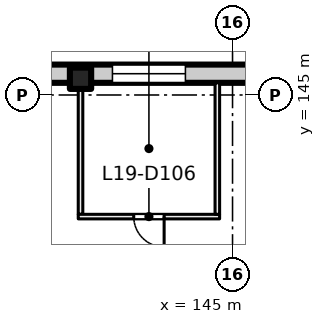
"""IFC4 building model, lengths in metres.
Left out: names, types, materials, properties, quantities, classifications, styles, units other than length and angle.
Written with IfcOpenShell. Run it as: python <this file> out.ifc"""

import sys

from ifc_helpers import new_model, si_unit, direction, frame, frame_2d, origin, origin_2d, place, context, subcontext, project, spatial, rectangle, extrude, element, fill, save


model = new_model("IFC4")
c1 = context("Model", 3, precision=1e-05, world=origin(), true_north=direction((0.0, 1.0)))
c2 = subcontext(c1, "Body", "Model", "MODEL_VIEW")
j1 = project(units=[si_unit("LENGTHUNIT", "METRE"), si_unit("PLANEANGLEUNIT", "RADIAN")], contexts=[c1])
p1 = place(None, origin())
s1 = spatial("IfcSite", under=j1, at=p1, CompositionType="ELEMENT")
p2 = place(p1, origin())
s2 = spatial("IfcBuilding", under=s1, at=p2, CompositionType="ELEMENT")
p3 = place(p2, frame((0.0, 0.0, 85.0)))
s3 = spatial("IfcBuildingStorey", under=s2, at=p3, CompositionType="ELEMENT", Elevation=85.0)
p4 = place(p3, frame((140.0, 145.55, 0.0), z_axis=(0.0, 0.0, 1.0), x_axis=(1.0, 0.0, 0.0)))
e1 = element("IfcColumn", 1, at=p4, inside=s3, PredefinedType="COLUMN", context=c2, shape_type="SweptSolid", body=[
    extrude(rectangle(XDim=0.7, YDim=0.7, at=origin_2d()), origin(), (0.0, 0.0, 1.0), 4.0),
])
p5 = place(p3, frame((131.07, 145.7, 0.0), z_axis=(0.0, 0.0, 1.0), x_axis=(1.0, 0.0, 0.0)))
e2 = element("IfcWall", 2, at=p5, inside=s3, PredefinedType="SOLIDWALL", context=c2, shape_type="SweptSolid", body=[
    extrude(rectangle(XDim=31.93, YDim=0.6, at=frame_2d((15.965, 0.0))), origin(), (0.0, 0.0, 1.0), 3.625),
])
p6 = place(p5, frame((0.98, 0.0, 0.9)))
e3 = element("IfcOpeningElement", 3, at=p6, cuts=e2, PredefinedType="OPENING", context=c2, shape_type="SweptSolid", body=[
    extrude(rectangle(XDim=2.4, YDim=2.4, at=frame_2d((1.2, 1.2))), frame((0.0, 0.31, 0.0), z_axis=(0.0, -1.0, 0.0), x_axis=(1.0, 0.0, 0.0)), (0.0, 0.0, 1.0), 0.62),
])
p7 = place(p5, frame((5.48, 0.0, 0.9)))
e4 = element("IfcOpeningElement", 4, at=p7, cuts=e2, PredefinedType="OPENING", context=c2, shape_type="SweptSolid", body=[
    extrude(rectangle(XDim=2.4, YDim=2.4, at=frame_2d((1.2, 1.2))), frame((0.0, 0.31, 0.0), z_axis=(0.0, -1.0, 0.0), x_axis=(1.0, 0.0, 0.0)), (0.0, 0.0, 1.0), 0.62),
])
p8 = place(p5, frame((9.98, 0.0, 0.9)))
e5 = element("IfcOpeningElement", 5, at=p8, cuts=e2, PredefinedType="OPENING", context=c2, shape_type="SweptSolid", body=[
    extrude(rectangle(XDim=2.4, YDim=2.4, at=frame_2d((1.2, 1.2))), frame((0.0, 0.31, 0.0), z_axis=(0.0, -1.0, 0.0), x_axis=(1.0, 0.0, 0.0)), (0.0, 0.0, 1.0), 0.62),
])
p9 = place(p5, frame((14.48, 0.0, 0.9)))
e6 = element("IfcOpeningElement", 6, at=p9, cuts=e2, PredefinedType="OPENING", context=c2, shape_type="SweptSolid", body=[
    extrude(rectangle(XDim=2.4, YDim=2.4, at=frame_2d((1.2, 1.2))), frame((0.0, 0.31, 0.0), z_axis=(0.0, -1.0, 0.0), x_axis=(1.0, 0.0, 0.0)), (0.0, 0.0, 1.0), 0.62),
])
p10 = place(p5, frame((18.98, 0.0, 0.9)))
e7 = element("IfcOpeningElement", 7, at=p10, cuts=e2, PredefinedType="OPENING", context=c2, shape_type="SweptSolid", body=[
    extrude(rectangle(XDim=2.4, YDim=2.4, at=frame_2d((1.2, 1.2))), frame((0.0, 0.31, 0.0), z_axis=(0.0, -1.0, 0.0), x_axis=(1.0, 0.0, 0.0)), (0.0, 0.0, 1.0), 0.62),
])
p11 = place(p5, frame((23.48, 0.0, 0.9)))
e8 = element("IfcOpeningElement", 8, at=p11, cuts=e2, PredefinedType="OPENING", context=c2, shape_type="SweptSolid", body=[
    extrude(rectangle(XDim=2.4, YDim=2.4, at=frame_2d((1.2, 1.2))), frame((0.0, 0.31, 0.0), z_axis=(0.0, -1.0, 0.0), x_axis=(1.0, 0.0, 0.0)), (0.0, 0.0, 1.0), 0.62),
])
p12 = place(p5, frame((27.98, 0.0, 0.9)))
e9 = element("IfcOpeningElement", 9, at=p12, cuts=e2, PredefinedType="OPENING", context=c2, shape_type="SweptSolid", body=[
    extrude(rectangle(XDim=2.4, YDim=2.4, at=frame_2d((1.2, 1.2))), frame((0.0, 0.31, 0.0), z_axis=(0.0, -1.0, 0.0), x_axis=(1.0, 0.0, 0.0)), (0.0, 0.0, 1.0), 0.62),
])
p13 = place(p3, frame((140.0, 141.075, 0.0), z_axis=(0.0, 0.0, 1.0), x_axis=(0.0, 1.0, 0.0)))
e10 = element("IfcWall", 10, at=p13, inside=s3, PredefinedType="PARTITIONING", context=c2, shape_type="SweptSolid", body=[
    extrude(rectangle(XDim=4.325, YDim=0.15, at=frame_2d((2.163, 0.0))), origin(), (0.0, 0.0, 1.0), 3.625),
])
p14 = place(p3, frame((144.575, 141.0, 0.0), z_axis=(0.0, 0.0, 1.0), x_axis=(-1.0, 0.0, 0.0)))
e11 = element("IfcWall", 11, at=p14, inside=s3, PredefinedType="PARTITIONING", context=c2, shape_type="SweptSolid", body=[
    extrude(rectangle(XDim=4.65, YDim=0.15, at=frame_2d((2.325, 0.0))), origin(), (0.0, 0.0, 1.0), 3.625),
])
p15 = place(p14, frame((1.825, 0.0, 0.0)))
e12 = element("IfcOpeningElement", 12, at=p15, cuts=e11, PredefinedType="OPENING", context=c2, shape_type="SweptSolid", body=[
    extrude(rectangle(XDim=1.0, YDim=2.1, at=frame_2d((0.5, 1.05))), frame((0.0, 0.085, 0.0), z_axis=(0.0, -1.0, 0.0), x_axis=(1.0, 0.0, 0.0)), (0.0, 0.0, 1.0), 0.17),
])
p16 = place(p3, frame((144.5, 145.4, 0.0), z_axis=(0.0, 0.0, 1.0), x_axis=(0.0, -1.0, 0.0)))
e13 = element("IfcWall", 13, at=p16, inside=s3, PredefinedType="PARTITIONING", context=c2, shape_type="SweptSolid", body=[
    extrude(rectangle(XDim=4.325, YDim=0.15, at=frame_2d((2.163, 0.0))), origin(), (0.0, 0.0, 1.0), 3.625),
])
p17 = place(p8, origin())
e14 = element("IfcWindow", 14, at=p17, inside=s3, PartitioningType="SINGLE_PANEL", PredefinedType="WINDOW", context=c2, shape_type="SweptSolid", body=[
    extrude(rectangle(XDim=2.4, YDim=2.4, at=frame_2d((1.2, 1.2))), frame((0.0, 0.03, 0.0), z_axis=(0.0, -1.0, 0.0), x_axis=(1.0, 0.0, 0.0)), (0.0, 0.0, 1.0), 0.06),
])
fill(e5, e14)
p18 = place(p15, origin())
e15 = element("IfcDoor", 15, at=p18, inside=s3, OperationType="SINGLE_SWING_LEFT", PredefinedType="DOOR", context=c2, shape_type="SweptSolid", body=[
    extrude(rectangle(XDim=1.0, YDim=2.1, at=frame_2d((0.5, 1.05))), frame((0.0, 0.025, 0.0), z_axis=(0.0, -1.0, 0.0), x_axis=(1.0, 0.0, 0.0)), (0.0, 0.0, 1.0), 0.05),
])
fill(e12, e15)
save(model, sys.argv[1])
